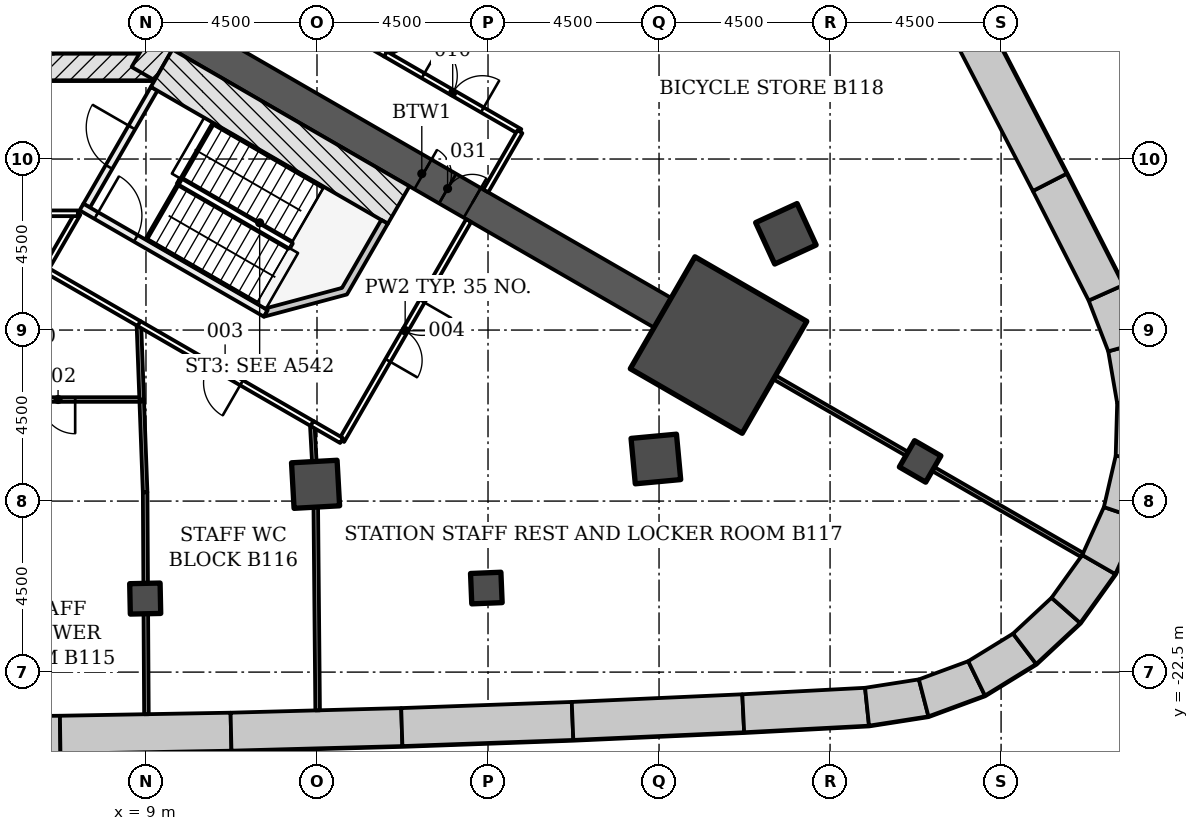
"""IFC4 building model, lengths in metres.
Left out: names, types, materials, properties, quantities, classifications, styles, units other than length and angle.
Written with IfcOpenShell. Run it as: python <this file> out.ifc"""

import sys

from ifc_helpers import new_model, si_unit, direction, frame, frame_2d, origin, origin_2d, place, context, subcontext, project, spatial, polyline, rectangle, outline, extrude, element, fill, save


model = new_model("IFC4")
c1 = context("Model", 3, precision=1e-05, world=origin(), true_north=direction((0.0, 1.0)))
c2 = subcontext(c1, "Body", "Model", "MODEL_VIEW")
j1 = project(units=[si_unit("LENGTHUNIT", "METRE"), si_unit("PLANEANGLEUNIT", "RADIAN")], contexts=[c1])
p1 = place(None, origin())
s1 = spatial("IfcSite", under=j1, at=p1, CompositionType="ELEMENT")
p2 = place(p1, origin())
s2 = spatial("IfcBuilding", under=s1, at=p2, CompositionType="ELEMENT")
p3 = place(p2, frame((0.0, 0.0, -4.5)))
s3 = spatial("IfcBuildingStorey", under=s2, at=p3, CompositionType="ELEMENT", Elevation=-4.5)
p4 = place(p3, origin())
e1 = element("IfcWall", 1, at=p4, inside=s3, PredefinedType="SOLIDWALL", context=c2, shape_type="SweptSolid", body=[
    extrude(outline(polyline([(2.25, -24.689), (6.75, -24.648), (6.736, -23.649), (2.246, -23.689), (2.25, -24.689)])), origin(), (0.0, 0.0, 1.0), 4.25),
])
p5 = place(p3, origin())
e2 = element("IfcWall", 2, at=p5, inside=s3, PredefinedType="SOLIDWALL", context=c2, shape_type="SweptSolid", body=[
    extrude(outline(polyline([(6.75, -24.648), (11.249, -24.568), (11.227, -23.568), (6.736, -23.649), (6.75, -24.648)])), origin(), (0.0, 0.0, 1.0), 4.25),
])
p6 = place(p3, origin())
e3 = element("IfcWall", 3, at=p6, inside=s3, PredefinedType="SOLIDWALL", context=c2, shape_type="SweptSolid", body=[
    extrude(outline(polyline([(11.249, -24.568), (15.747, -24.446), (15.716, -23.447), (11.227, -23.568), (11.249, -24.568)])), origin(), (0.0, 0.0, 1.0), 4.25),
])
p7 = place(p3, origin())
e4 = element("IfcWall", 4, at=p7, inside=s3, PredefinedType="SOLIDWALL", context=c2, shape_type="SweptSolid", body=[
    extrude(outline(polyline([(15.747, -24.446), (20.244, -24.285), (20.204, -23.285), (15.716, -23.447), (15.747, -24.446)])), origin(), (0.0, 0.0, 1.0), 4.25),
])
p8 = place(p3, origin())
e5 = element("IfcWall", 5, at=p8, inside=s3, PredefinedType="SOLIDWALL", context=c2, shape_type="SweptSolid", body=[
    extrude(outline(polyline([(20.244, -24.285), (24.74, -24.083), (24.691, -23.084), (20.204, -23.285), (20.244, -24.285)])), origin(), (0.0, 0.0, 1.0), 4.25),
])
p9 = place(p3, origin())
e6 = element("IfcWall", 6, at=p9, inside=s3, PredefinedType="SOLIDWALL", context=c2, shape_type="SweptSolid", body=[
    extrude(outline(polyline([(24.74, -24.083), (28.025, -23.909), (27.921, -22.913), (24.691, -23.084), (24.74, -24.083)])), origin(), (0.0, 0.0, 1.0), 4.25),
])
p10 = place(p3, origin())
e7 = element("IfcWall", 7, at=p10, inside=s3, PredefinedType="SOLIDWALL", context=c2, shape_type="SweptSolid", body=[
    extrude(outline(polyline([(28.025, -23.909), (29.589, -23.665), (29.337, -22.692), (27.921, -22.913), (28.025, -23.909)])), origin(), (0.0, 0.0, 1.0), 4.25),
])
p11 = place(p3, origin())
e8 = element("IfcWall", 8, at=p11, inside=s3, PredefinedType="SOLIDWALL", context=c2, shape_type="SweptSolid", body=[
    extrude(outline(polyline([(29.589, -23.665), (31.075, -23.117), (30.635, -22.213), (29.337, -22.692), (29.589, -23.665)])), origin(), (0.0, 0.0, 1.0), 4.25),
])
p12 = place(p3, origin())
e9 = element("IfcWall", 9, at=p12, inside=s3, PredefinedType="SOLIDWALL", context=c2, shape_type="SweptSolid", body=[
    extrude(outline(polyline([(31.075, -23.117), (32.423, -22.287), (31.815, -21.487), (30.635, -22.213), (31.075, -23.117)])), origin(), (0.0, 0.0, 1.0), 4.25),
])
p13 = place(p3, origin())
e10 = element("IfcWall", 10, at=p13, inside=s3, PredefinedType="SOLIDWALL", context=c2, shape_type="SweptSolid", body=[
    extrude(outline(polyline([(32.423, -22.287), (33.582, -21.208), (32.828, -20.544), (31.815, -21.487), (32.423, -22.287)])), origin(), (0.0, 0.0, 1.0), 4.25),
])
p14 = place(p3, origin())
e11 = element("IfcWall", 11, at=p14, inside=s3, PredefinedType="SOLIDWALL", context=c2, shape_type="SweptSolid", body=[
    extrude(outline(polyline([(33.582, -21.208), (34.506, -19.922), (33.635, -19.419), (32.828, -20.544), (33.582, -21.208)])), origin(), (0.0, 0.0, 1.0), 4.25),
])
p15 = place(p3, origin())
e12 = element("IfcWall", 12, at=p15, inside=s3, PredefinedType="SOLIDWALL", context=c2, shape_type="SweptSolid", body=[
    extrude(outline(polyline([(34.506, -19.922), (35.158, -18.479), (34.205, -18.158), (33.635, -19.419), (34.506, -19.922)])), origin(), (0.0, 0.0, 1.0), 4.25),
])
p16 = place(p3, origin())
e13 = element("IfcWall", 13, at=p16, inside=s3, PredefinedType="SOLIDWALL", context=c2, shape_type="SweptSolid", body=[
    extrude(outline(polyline([(35.158, -18.479), (35.513, -16.936), (34.516, -16.809), (34.205, -18.158), (35.158, -18.479)])), origin(), (0.0, 0.0, 1.0), 4.25),
])
p17 = place(p3, origin())
e14 = element("IfcWall", 14, at=p17, inside=s3, PredefinedType="SOLIDWALL", context=c2, shape_type="SweptSolid", body=[
    extrude(outline(polyline([(35.513, -16.936), (35.557, -15.353), (34.555, -15.425), (34.516, -16.809), (35.513, -16.936)])), origin(), (0.0, 0.0, 1.0), 4.25),
])
p18 = place(p3, origin())
e15 = element("IfcWall", 15, at=p18, inside=s3, PredefinedType="SOLIDWALL", context=c2, shape_type="SweptSolid", body=[
    extrude(outline(polyline([(35.557, -15.353), (35.289, -13.793), (34.32, -14.06), (34.555, -15.425), (35.557, -15.353)])), origin(), (0.0, 0.0, 1.0), 4.25),
])
p19 = place(p3, origin())
e16 = element("IfcWall", 16, at=p19, inside=s3, PredefinedType="SOLIDWALL", context=c2, shape_type="SweptSolid", body=[
    extrude(outline(polyline([(35.289, -13.793), (34.719, -12.316), (33.804, -12.724), (34.32, -14.06), (35.289, -13.793)])), origin(), (0.0, 0.0, 1.0), 4.25),
])
p20 = place(p3, origin())
e17 = element("IfcWall", 17, at=p20, inside=s3, PredefinedType="SOLIDWALL", context=c2, shape_type="SweptSolid", body=[
    extrude(outline(polyline([(34.719, -12.316), (33.226, -9.384), (32.337, -9.841), (33.804, -12.724), (34.719, -12.316)])), origin(), (0.0, 0.0, 1.0), 4.25),
])
p21 = place(p3, origin())
e18 = element("IfcWall", 18, at=p21, inside=s3, PredefinedType="SOLIDWALL", context=c2, shape_type="SweptSolid", body=[
    extrude(outline(polyline([(33.226, -9.384), (31.153, -5.39), (30.268, -5.854), (32.337, -9.841), (33.226, -9.384)])), origin(), (0.0, 0.0, 1.0), 4.25),
])
for number, where, z_axis, x_axis in (
    (19, (13.462, -17.558, -0.3), (0.0, 0.0, 1.0), (0.056, -0.998, 0.0)),
    (20, (22.417, -16.893, -0.3), (0.0, 0.0, 1.0), (0.093, -0.996, 0.0)),
    (21, (25.838, -10.967, -0.3), (0.0, 0.0, 1.0), (0.909, 0.418, 0.0)),
):
    element("IfcColumn", number, at=place(p3, frame(where, z_axis=z_axis, x_axis=x_axis)), inside=s3, PredefinedType="COLUMN", context=c2, shape_type="SweptSolid", body=[
        extrude(rectangle(XDim=1.2, YDim=1.2, at=origin_2d()), origin(), (0.0, 0.0, 1.0), 4.55),
    ])
for number, where, z_axis, x_axis in (
    (22, (8.98, -20.565, -0.3), (0.0, 0.0, 1.0), (0.021, -1.0, 0.0)),
    (23, (17.956, -20.288, -0.3), (0.0, 0.0, 1.0), (0.041, -0.999, 0.0)),
    (24, (29.37, -16.957, -0.3), (0.0, 0.0, 1.0), (0.866, -0.5, 0.0)),
):
    element("IfcColumn", number, at=place(p3, frame(where, z_axis=z_axis, x_axis=x_axis)), inside=s3, PredefinedType="COLUMN", context=c2, shape_type="SweptSolid", body=[
        extrude(rectangle(XDim=0.8, YDim=0.8, at=origin_2d()), origin(), (0.0, 0.0, 1.0), 4.55),
    ])
p22 = place(p3, frame((-9.229, -6.578, -0.3), z_axis=(0.0, 0.0, 1.0), x_axis=(1.0, 0.0, 0.0)))
e25 = element("IfcWall", 25, at=p22, inside=s3, PredefinedType="SHEAR", context=c2, shape_type="SweptSolid", body=[
    extrude(rectangle(XDim=18.458, YDim=0.7, at=frame_2d((9.229, 0.0))), origin(), (0.0, 0.0, 1.0), 4.55),
])
p23 = place(p22, frame((1.079, 0.0, 0.3)))
e26 = element("IfcOpeningElement", 26, at=p23, cuts=e25, PredefinedType="OPENING", context=c2, shape_type="SweptSolid", body=[
    extrude(rectangle(XDim=0.9, YDim=2.1, at=frame_2d((0.45, 1.05))), frame((0.0, 0.36, 0.0), z_axis=(0.0, -1.0, 0.0), x_axis=(1.0, 0.0, 0.0)), (0.0, 0.0, 1.0), 0.72),
])
p24 = place(p3, frame((8.926, -6.753, -0.3), z_axis=(0.0, 0.0, 1.0), x_axis=(0.500042739161, 0.866000726912, 0.0)))
e27 = element("IfcWall", 27, at=p24, inside=s3, PredefinedType="SHEAR", context=c2, shape_type="SweptSolid", body=[
    extrude(rectangle(XDim=2.771, YDim=0.7, at=frame_2d((1.386, 0.0))), origin(), (0.0, 0.0, 1.0), 4.55),
])
p25 = place(p3, frame((9.922, -5.728, -0.3), z_axis=(0.0, 0.0, 1.0), x_axis=(0.866028046028, -0.499995423472, 0.0)))
e28 = element("IfcWall", 28, at=p25, inside=s3, PredefinedType="SHEAR", context=c2, shape_type="SweptSolid", body=[
    extrude(rectangle(XDim=14.633, YDim=0.9, at=frame_2d((7.316, 0.0))), origin(), (0.0, 0.0, 1.0), 4.55),
])
p26 = place(p25, frame((7.35, 0.0, 0.3)))
e29 = element("IfcOpeningElement", 29, at=p26, cuts=e28, PredefinedType="OPENING", context=c2, shape_type="SweptSolid", body=[
    extrude(rectangle(XDim=1.5, YDim=2.1, at=frame_2d((0.75, 1.05))), frame((0.0, 0.46, 0.0), z_axis=(0.0, -1.0, 0.0), x_axis=(1.0, 0.0, 0.0)), (0.0, 0.0, 1.0), 0.92),
])
p27 = place(p3, frame((24.066, -13.895, -0.3), z_axis=(0.0, 0.0, 1.0), x_axis=(0.866025403784, -0.5, 0.0)))
e30 = element("IfcColumn", 30, at=p27, inside=s3, PredefinedType="COLUMN", context=c2, shape_type="SweptSolid", body=[
    extrude(rectangle(XDim=3.4, YDim=3.4, at=origin_2d()), origin(), (0.0, 0.0, 1.0), 4.55),
])
p28 = place(p3, frame((6.45, -6.228, 0.0), z_axis=(0.0, 0.0, 1.0), x_axis=(0.0, 1.0, 0.0)))
e31 = element("IfcWall", 31, at=p28, inside=s3, PredefinedType="PARTITIONING", context=c2, shape_type="SweptSolid", body=[
    extrude(rectangle(XDim=2.5, YDim=0.25, at=frame_2d((1.25, 0.0))), origin(), (0.0, 0.0, 1.0), 4.25),
])
p29 = place(p3, frame((7.44, -10.226, -0.3), z_axis=(0.0, 0.0, 1.0), x_axis=(0.500022077904, 0.866012656725, 0.0)))
e32 = element("IfcWall", 32, at=p29, inside=s3, PredefinedType="SHEAR", context=c2, shape_type="SweptSolid", body=[
    extrude(rectangle(XDim=3.55, YDim=0.2, at=frame_2d((1.775, 0.0))), origin(), (0.0, 0.0, 1.0), 4.55),
])
p30 = place(p29, frame((1.175, 0.0, 0.3)))
e33 = element("IfcOpeningElement", 33, at=p30, cuts=e32, PredefinedType="OPENING", context=c2, shape_type="SweptSolid", body=[
    extrude(rectangle(XDim=1.2, YDim=2.1, at=frame_2d((0.6, 1.05))), frame((0.0, 0.11, 0.0), z_axis=(0.0, -1.0, 0.0), x_axis=(1.0, 0.0, 0.0)), (0.0, 0.0, 1.0), 0.22),
])
p31 = place(p3, frame((7.304, -10.262, -0.3), z_axis=(0.0, 0.0, 1.0), x_axis=(0.866026594901, -0.49999793692, 0.0)))
e34 = element("IfcWall", 34, at=p31, inside=s3, PredefinedType="SHEAR", context=c2, shape_type="SweptSolid", body=[
    extrude(rectangle(XDim=5.6, YDim=0.2, at=frame_2d((2.8, 0.0))), origin(), (0.0, 0.0, 1.0), 4.55),
])
p32 = place(p31, frame((0.45, 0.0, 0.3)))
e35 = element("IfcOpeningElement", 35, at=p32, cuts=e34, PredefinedType="OPENING", context=c2, shape_type="SweptSolid", body=[
    extrude(rectangle(XDim=1.2, YDim=2.1, at=frame_2d((0.6, 1.05))), frame((0.0, 0.11, 0.0), z_axis=(0.0, -1.0, 0.0), x_axis=(1.0, 0.0, 0.0)), (0.0, 0.0, 1.0), 0.22),
])
p33 = place(p3, frame((9.413, -6.61, -0.3), z_axis=(0.0, 0.0, 1.0), x_axis=(0.866018442252, -0.500012057535, 0.0)))
e36 = element("IfcWall", 36, at=p33, inside=s3, PredefinedType="SHEAR", context=c2, shape_type="SweptSolid", body=[
    extrude(rectangle(XDim=7.2, YDim=1.136, at=frame_2d((3.6, 0.0))), origin(), (0.0, 0.0, 1.0), 4.55),
])
p34 = place(p3, frame((0.0, 0.0, -0.3)))
e37 = element("IfcWall", 37, at=p34, inside=s3, PredefinedType="SHEAR", context=c2, shape_type="SweptSolid", body=[
    extrude(outline(polyline([(12.104, -13.149), (14.289, -12.563), (15.364, -10.701), (15.191, -10.601), (14.157, -12.392), (12.132, -12.934), (12.204, -12.976), (12.204, -12.976), (12.204, -12.976), (12.204, -12.976), (12.204, -12.976), (12.204, -12.976), (12.204, -12.976), (12.204, -12.976), (12.204, -12.976), (12.204, -12.976), (12.204, -12.976), (12.204, -12.976), (12.204, -12.976), (12.204, -12.976), (12.204, -12.976), (12.204, -12.976), (12.204, -12.976), (12.104, -13.149)])), origin(), (0.0, 0.0, 1.0), 4.55),
])
p35 = place(p3, frame((8.992, -20.165, 0.0), z_axis=(0.0, 0.0, 1.0), x_axis=(-0.005803200997, 0.999983161287, 0.0)))
e38 = element("IfcWall", 38, at=p35, inside=s3, PredefinedType="PARTITIONING", context=c2, shape_type="SweptSolid", body=[
    extrude(rectangle(XDim=2.398, YDim=0.12, at=frame_2d((1.199, 0.0))), origin(), (0.0, 0.0, 1.0), 3.638),
])
p36 = place(p3, frame((8.978, -17.767, 0.0), z_axis=(0.0, 0.0, 1.0), x_axis=(-0.037248042069, 0.999306050898, 0.0)))
e39 = element("IfcWall", 39, at=p36, inside=s3, PredefinedType="PARTITIONING", context=c2, shape_type="SweptSolid", body=[
    extrude(rectangle(XDim=2.445, YDim=0.12, at=frame_2d((1.222, 0.0))), origin(), (0.0, 0.0, 1.0), 3.638),
])
p37 = place(p3, frame((9.012, -23.608, 0.0), z_axis=(0.0, 0.0, 1.0), x_axis=(-0.006004510691, 0.999981972763, 0.0)))
e40 = element("IfcWall", 40, at=p37, inside=s3, PredefinedType="PARTITIONING", context=c2, shape_type="SweptSolid", body=[
    extrude(rectangle(XDim=2.643, YDim=0.12, at=frame_2d((1.321, 0.0))), origin(), (0.0, 0.0, 1.0), 4.25),
])
p38 = place(p3, frame((8.887, -15.328, 0.0), z_axis=(0.0, 0.0, 1.0), x_axis=(-1.0, 0.0, 0.0)))
e41 = element("IfcWall", 41, at=p38, inside=s3, PredefinedType="PARTITIONING", context=c2, shape_type="SweptSolid", body=[
    extrude(rectangle(XDim=4.445, YDim=0.12, at=frame_2d((2.223, 0.0))), origin(), (0.0, 0.0, 1.0), 3.638),
])
p39 = place(p38, frame((1.75, 0.0, 0.0)))
e42 = element("IfcOpeningElement", 42, at=p39, cuts=e41, PredefinedType="OPENING", context=c2, shape_type="SweptSolid", body=[
    extrude(rectangle(XDim=0.9, YDim=2.1, at=frame_2d((0.45, 1.05))), frame((0.0, 0.07, 0.0), z_axis=(0.0, -1.0, 0.0), x_axis=(1.0, 0.0, 0.0)), (0.0, 0.0, 1.0), 0.14),
])
p40 = place(p3, frame((13.429, -16.959, 0.0), z_axis=(0.0, 0.0, 1.0), x_axis=(-0.055009625476, 0.998485824188, 0.0)))
e43 = element("IfcWall", 43, at=p40, inside=s3, PredefinedType="PARTITIONING", context=c2, shape_type="SweptSolid", body=[
    extrude(rectangle(XDim=0.999, YDim=0.12, at=frame_2d((0.499, 0.0))), origin(), (0.0, 0.0, 1.0), 3.638),
])
p41 = place(p3, frame((13.517, -23.506, 0.0), z_axis=(0.0, 0.0, 1.0), x_axis=(-0.00917685765, 0.999957891755, 0.0)))
e44 = element("IfcWall", 44, at=p41, inside=s3, PredefinedType="PARTITIONING", context=c2, shape_type="SweptSolid", body=[
    extrude(rectangle(XDim=5.347, YDim=0.12, at=frame_2d((2.674, 0.0))), origin(), (0.0, 0.0, 1.0), 3.633),
])
p42 = place(p3, frame((8.813, -13.328, 0.0), z_axis=(0.0, 0.0, 1.0), x_axis=(0.036980062174, -0.999316003575, 0.0)))
e45 = element("IfcWall", 45, at=p42, inside=s3, PredefinedType="PARTITIONING", context=c2, shape_type="SweptSolid", body=[
    extrude(rectangle(XDim=2.0, YDim=0.12, at=frame_2d((1.0, 0.0))), origin(), (0.0, 0.0, 1.0), 3.638),
])
p43 = place(p3, frame((13.377, -15.963, 0.0), z_axis=(0.0, 0.0, 1.0), x_axis=(-0.865969754012, 0.500096375847, 0.0)))
e46 = element("IfcWall", 46, at=p43, inside=s3, PredefinedType="PARTITIONING", context=c2, shape_type="SweptSolid", body=[
    extrude(rectangle(XDim=5.275, YDim=0.15, at=frame_2d((2.637, 0.0))), origin(), (0.0, 0.0, 1.0), 3.638),
])
p44 = place(p43, frame((2.15, 0.0, 0.0)))
e47 = element("IfcOpeningElement", 47, at=p44, cuts=e46, PredefinedType="OPENING", context=c2, shape_type="SweptSolid", body=[
    extrude(rectangle(XDim=1.0, YDim=2.1, at=frame_2d((0.5, 1.05))), frame((0.0, 0.085, 0.0), z_axis=(0.0, -1.0, 0.0), x_axis=(1.0, 0.0, 0.0)), (0.0, 0.0, 1.0), 0.17),
])
p45 = place(p3, frame((17.491, -10.618, 0.0), z_axis=(0.0, 0.0, 1.0), x_axis=(-0.499969057507, -0.866043267704, 0.0)))
e48 = element("IfcWall", 48, at=p45, inside=s3, PredefinedType="PARTITIONING", context=c2, shape_type="SweptSolid", body=[
    extrude(rectangle(XDim=6.685, YDim=0.15, at=frame_2d((3.342, 0.0))), origin(), (0.0, 0.0, 1.0), 3.638),
])
p46 = place(p45, frame((2.45, 0.0, 0.0)))
e49 = element("IfcOpeningElement", 49, at=p46, cuts=e48, PredefinedType="OPENING", context=c2, shape_type="SweptSolid", body=[
    extrude(rectangle(XDim=1.8, YDim=2.1, at=frame_2d((0.9, 1.05))), frame((0.0, 0.085, 0.0), z_axis=(0.0, -1.0, 0.0), x_axis=(1.0, 0.0, 0.0)), (0.0, 0.0, 1.0), 0.17),
])
p47 = place(p3, frame((14.147, -16.407, 0.0), z_axis=(0.0, 0.0, 1.0), x_axis=(-0.866276218641, 0.499565324075, 0.0)))
e50 = element("IfcWall", 50, at=p47, inside=s3, PredefinedType="PARTITIONING", context=c2, shape_type="SweptSolid", body=[
    extrude(rectangle(XDim=0.897, YDim=0.15, at=frame_2d((0.448, 0.0))), origin(), (0.0, 0.0, 1.0), 3.638),
])
p48 = place(p3, frame((29.023, -16.757, 0.0), z_axis=(0.0, 0.0, 1.0), x_axis=(-0.866027971625, 0.499995552344, 0.0)))
e51 = element("IfcWall", 51, at=p48, inside=s3, PredefinedType="PARTITIONING", context=c2, shape_type="SweptSolid", body=[
    extrude(rectangle(XDim=4.024, YDim=0.12, at=frame_2d((2.012, 0.0))), origin(), (0.0, 0.0, 1.0), 3.717),
])
p49 = place(p3, frame((33.634, -19.419, 0.0), z_axis=(0.0, 0.0, 1.0), x_axis=(-0.866032814021, 0.499987164874, 0.0)))
e52 = element("IfcWall", 52, at=p49, inside=s3, PredefinedType="PARTITIONING", context=c2, shape_type="SweptSolid", body=[
    extrude(rectangle(XDim=4.524, YDim=0.12, at=frame_2d((2.262, 0.0))), origin(), (0.0, 0.0, 1.0), 4.25),
])
p50 = place(p3, frame((8.817, -13.33, 0.0), z_axis=(0.0, 0.0, 1.0), x_axis=(-0.865999736111, 0.50004445508, 0.0)))
e53 = element("IfcWall", 53, at=p50, inside=s3, PredefinedType="PARTITIONING", context=c2, shape_type="SweptSolid", body=[
    extrude(rectangle(XDim=2.844, YDim=0.15, at=frame_2d((1.422, 0.0))), origin(), (0.0, 0.0, 1.0), 3.638),
])
p51 = place(p3, frame((6.354, -11.906, 0.0), z_axis=(0.0, 0.0, 1.0), x_axis=(0.500539815233, 0.865713516913, 0.0)))
e54 = element("IfcWall", 54, at=p51, inside=s3, PredefinedType="PARTITIONING", context=c2, shape_type="SweptSolid", body=[
    extrude(rectangle(XDim=1.706, YDim=0.15, at=frame_2d((0.853, 0.0))), origin(), (0.0, 0.0, 1.0), 4.25),
])
p52 = place(p3, frame((7.208, -10.428, 0.0), z_axis=(0.0, 0.0, 1.0), x_axis=(-1.0, 0.0, 0.0)))
e55 = element("IfcWall", 55, at=p52, inside=s3, PredefinedType="PARTITIONING", context=c2, shape_type="SweptSolid", body=[
    extrude(rectangle(XDim=2.861, YDim=0.15, at=frame_2d((1.431, 0.0))), origin(), (0.0, 0.0, 1.0), 3.638),
])
p53 = place(p52, frame((0.95, 0.0, 0.0)))
e56 = element("IfcOpeningElement", 56, at=p53, cuts=e55, PredefinedType="OPENING", context=c2, shape_type="SweptSolid", body=[
    extrude(rectangle(XDim=0.9, YDim=2.1, at=frame_2d((0.45, 1.05))), frame((0.0, 0.085, 0.0), z_axis=(0.0, -1.0, 0.0), x_axis=(1.0, 0.0, 0.0)), (0.0, 0.0, 1.0), 0.17),
])
p54 = place(p3, frame((20.836, -3.436, 0.0), z_axis=(0.0, 0.0, 1.0), x_axis=(-0.89244304116, -0.451160080554, 0.0)))
e57 = element("IfcWall", 57, at=p54, inside=s3, PredefinedType="PARTITIONING", context=c2, shape_type="SweptSolid", body=[
    extrude(rectangle(XDim=6.204, YDim=0.12, at=frame_2d((3.102, 0.0))), origin(), (0.0, 0.0, 1.0), 3.638),
])
p55 = place(p3, frame((15.295, -6.232, 0.0), z_axis=(0.0, 0.0, 1.0), x_axis=(0.865991915229, -0.500057999394, 0.0)))
e58 = element("IfcWall", 58, at=p55, inside=s3, PredefinedType="PARTITIONING", context=c2, shape_type="SweptSolid", body=[
    extrude(rectangle(XDim=4.094, YDim=0.15, at=frame_2d((2.047, 0.0))), origin(), (0.0, 0.0, 1.0), 3.638),
])
p56 = place(p55, frame((1.15, 0.0, 0.0)))
e59 = element("IfcOpeningElement", 59, at=p56, cuts=e58, PredefinedType="OPENING", context=c2, shape_type="SweptSolid", body=[
    extrude(rectangle(XDim=1.8, YDim=2.1, at=frame_2d((0.9, 1.05))), frame((0.0, 0.085, 0.0), z_axis=(0.0, -1.0, 0.0), x_axis=(1.0, 0.0, 0.0)), (0.0, 0.0, 1.0), 0.17),
])
p57 = place(p3, frame((18.84, -8.281, 0.0), z_axis=(0.0, 0.0, 1.0), x_axis=(-0.500126010714, -0.86595263924, 0.0)))
e60 = element("IfcWall", 60, at=p57, inside=s3, PredefinedType="PARTITIONING", context=c2, shape_type="SweptSolid", body=[
    extrude(rectangle(XDim=1.798, YDim=0.15, at=frame_2d((0.899, 0.0))), origin(), (0.0, 0.0, 1.0), 3.638),
])
p58 = place(p3, frame((14.078, -5.529, 0.0), z_axis=(0.0, 0.0, 1.0), x_axis=(0.865984561414, -0.500070734389, 0.0)))
e61 = element("IfcWall", 61, at=p58, inside=s3, PredefinedType="PARTITIONING", context=c2, shape_type="SweptSolid", body=[
    extrude(rectangle(XDim=1.416, YDim=0.15, at=frame_2d((0.708, 0.0))), origin(), (0.0, 0.0, 1.0), 3.638),
])
p59 = place(p30, origin())
e62 = element("IfcDoor", 62, at=p59, inside=s3, OperationType="SINGLE_SWING_RIGHT", PredefinedType="DOOR", context=c2, shape_type="SweptSolid", body=[
    extrude(rectangle(XDim=1.2, YDim=2.1, at=frame_2d((0.6, 1.05))), frame((0.0, 0.025, 0.0), z_axis=(0.0, -1.0, 0.0), x_axis=(1.0, 0.0, 0.0)), (0.0, 0.0, 1.0), 0.05),
])
fill(e33, e62)
p60 = place(p32, origin())
e63 = element("IfcDoor", 63, at=p60, inside=s3, OperationType="SINGLE_SWING_LEFT", PredefinedType="DOOR", context=c2, shape_type="SweptSolid", body=[
    extrude(rectangle(XDim=1.2, YDim=2.1, at=frame_2d((0.6, 1.05))), frame((0.0, 0.025, 0.0), z_axis=(0.0, -1.0, 0.0), x_axis=(1.0, 0.0, 0.0)), (0.0, 0.0, 1.0), 0.05),
])
fill(e35, e63)
p61 = place(p39, origin())
e64 = element("IfcDoor", 64, at=p61, inside=s3, OperationType="SINGLE_SWING_LEFT", PredefinedType="DOOR", context=c2, shape_type="SweptSolid", body=[
    extrude(rectangle(XDim=0.9, YDim=2.1, at=frame_2d((0.45, 1.05))), frame((0.0, 0.025, 0.0), z_axis=(0.0, -1.0, 0.0), x_axis=(1.0, 0.0, 0.0)), (0.0, 0.0, 1.0), 0.05),
])
fill(e42, e64)
p62 = place(p44, origin())
e65 = element("IfcDoor", 65, at=p62, inside=s3, OperationType="SINGLE_SWING_RIGHT", PredefinedType="DOOR", context=c2, shape_type="SweptSolid", body=[
    extrude(rectangle(XDim=1.0, YDim=2.1, at=frame_2d((0.5, 1.05))), frame((0.0, 0.025, 0.0), z_axis=(0.0, -1.0, 0.0), x_axis=(1.0, 0.0, 0.0)), (0.0, 0.0, 1.0), 0.05),
])
fill(e47, e65)
p63 = place(p46, origin())
e66 = element("IfcDoor", 66, at=p63, inside=s3, OperationType="DOUBLE_DOOR_SINGLE_SWING", PredefinedType="DOOR", context=c2, shape_type="SweptSolid", body=[
    extrude(rectangle(XDim=1.8, YDim=2.1, at=frame_2d((0.9, 1.05))), frame((0.0, 0.025, 0.0), z_axis=(0.0, -1.0, 0.0), x_axis=(1.0, 0.0, 0.0)), (0.0, 0.0, 1.0), 0.05),
])
fill(e49, e66)
p64 = place(p56, origin())
e67 = element("IfcDoor", 67, at=p64, inside=s3, OperationType="DOUBLE_DOOR_SINGLE_SWING", PredefinedType="DOOR", context=c2, shape_type="SweptSolid", body=[
    extrude(rectangle(XDim=1.8, YDim=2.1, at=frame_2d((0.9, 1.05))), frame((0.0, 0.025, 0.0), z_axis=(0.0, -1.0, 0.0), x_axis=(1.0, 0.0, 0.0)), (0.0, 0.0, 1.0), 0.05),
])
fill(e59, e67)
p65 = place(p26, origin())
e68 = element("IfcDoor", 68, at=p65, inside=s3, OperationType="DOUBLE_DOOR_SINGLE_SWING", PredefinedType="DOOR", context=c2, shape_type="SweptSolid", body=[
    extrude(rectangle(XDim=1.5, YDim=2.1, at=frame_2d((0.75, 1.05))), frame((0.0, 0.025, 0.0), z_axis=(0.0, -1.0, 0.0), x_axis=(1.0, 0.0, 0.0)), (0.0, 0.0, 1.0), 0.05),
])
fill(e29, e68)
save(model, sys.argv[1])
